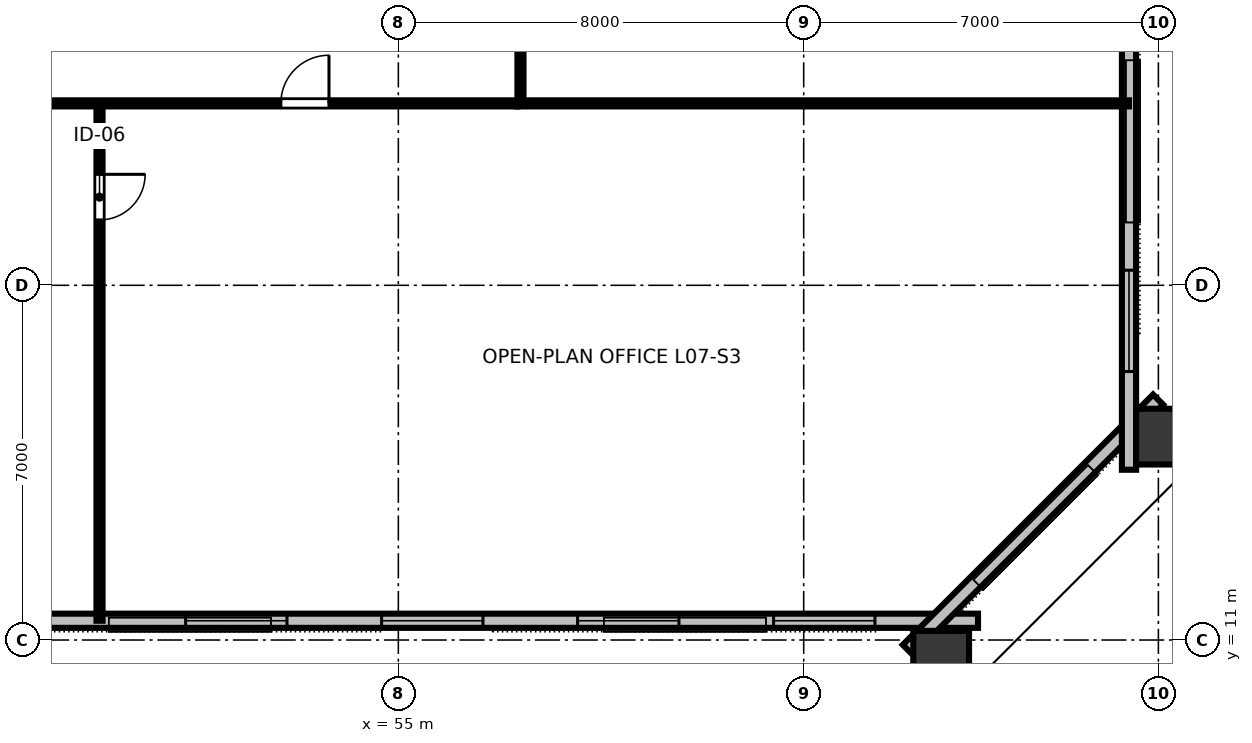
"""IFC4 building model, lengths in metres.
Left out: names, types, materials, properties, quantities, classifications, styles, units other than length and angle.
Written with IfcOpenShell. Run it as: python <this file> out.ifc"""

import sys

from ifc_helpers import new_model, si_unit, direction, frame, frame_2d, origin, origin_2d, place, context, subcontext, project, spatial, rectangle, hollow_rectangle, extrude, element, fill, save


model = new_model("IFC4")
c1 = context("Model", 3, precision=1e-05, world=origin(), true_north=direction((0.0, 1.0)))
c2 = subcontext(c1, "Body", "Model", "MODEL_VIEW")
j1 = project(units=[si_unit("LENGTHUNIT", "METRE"), si_unit("PLANEANGLEUNIT", "RADIAN")], contexts=[c1])
p1 = place(None, origin())
s1 = spatial("IfcSite", under=j1, at=p1, CompositionType="ELEMENT")
p2 = place(p1, origin())
s2 = spatial("IfcBuilding", under=s1, at=p2, CompositionType="ELEMENT")
p3 = place(p2, frame((0.0, 0.0, 31.6)))
s3 = spatial("IfcBuildingStorey", under=s2, at=p3, CompositionType="ELEMENT", Elevation=31.6)
for number, where, z_axis, x_axis in (
    (1, (65.713, 10.531, 0.0), (0.0, 0.0, 1.0), (1.0, 0.0, 0.0)),
    (2, (70.211, 15.013, 0.0), (0.0, 0.0, 1.0), (0.0, 1.0, 0.0)),
):
    element("IfcColumn", number, at=place(p3, frame(where, z_axis=z_axis, x_axis=x_axis)), inside=s3, PredefinedType="COLUMN", context=c2, shape_type="SweptSolid", body=[
        extrude(hollow_rectangle(XDim=1.1, YDim=1.3, WallThickness=0.07, at=origin_2d()), origin(), (0.0, 0.0, 1.0), 3.148),
    ])
p4 = place(p3, frame((25.56, 11.38, 0.0), z_axis=(0.0, 0.0, 1.0), x_axis=(1.0, 0.0, 0.0)))
e3 = element("IfcWall", 3, at=p4, inside=s3, PredefinedType="STANDARD", context=c2, shape_type="SweptSolid", body=[
    extrude(rectangle(XDim=40.88, YDim=0.28, at=frame_2d((20.44, 0.0))), origin(), (0.0, 0.0, 1.0), 3.15),
])
p5 = place(p4, frame((2.034, 0.0, 0.8)))
e4 = element("IfcOpeningElement", 4, at=p5, cuts=e3, PredefinedType="OPENING", context=c2, shape_type="SweptSolid", body=[
    extrude(rectangle(XDim=2.0, YDim=1.95, at=frame_2d((1.0, 0.975))), frame((0.0, 0.15, 0.0), z_axis=(0.0, -1.0, 0.0), x_axis=(1.0, 0.0, 0.0)), (0.0, 0.0, 1.0), 0.3),
])
p6 = place(p4, frame((5.902, 0.0, 0.8)))
e5 = element("IfcOpeningElement", 5, at=p6, cuts=e3, PredefinedType="OPENING", context=c2, shape_type="SweptSolid", body=[
    extrude(rectangle(XDim=2.0, YDim=1.95, at=frame_2d((1.0, 0.975))), frame((0.0, 0.15, 0.0), z_axis=(0.0, -1.0, 0.0), x_axis=(1.0, 0.0, 0.0)), (0.0, 0.0, 1.0), 0.3),
])
p7 = place(p4, frame((9.77, 0.0, 0.8)))
e6 = element("IfcOpeningElement", 6, at=p7, cuts=e3, PredefinedType="OPENING", context=c2, shape_type="SweptSolid", body=[
    extrude(rectangle(XDim=2.0, YDim=1.95, at=frame_2d((1.0, 0.975))), frame((0.0, 0.15, 0.0), z_axis=(0.0, -1.0, 0.0), x_axis=(1.0, 0.0, 0.0)), (0.0, 0.0, 1.0), 0.3),
])
p8 = place(p4, frame((25.242, 0.0, 0.8)))
e7 = element("IfcOpeningElement", 7, at=p8, cuts=e3, PredefinedType="OPENING", context=c2, shape_type="SweptSolid", body=[
    extrude(rectangle(XDim=2.0, YDim=1.95, at=frame_2d((1.0, 0.975))), frame((0.0, 0.15, 0.0), z_axis=(0.0, -1.0, 0.0), x_axis=(1.0, 0.0, 0.0)), (0.0, 0.0, 1.0), 0.3),
])
p9 = place(p4, frame((29.11, 0.0, 0.8)))
e8 = element("IfcOpeningElement", 8, at=p9, cuts=e3, PredefinedType="OPENING", context=c2, shape_type="SweptSolid", body=[
    extrude(rectangle(XDim=2.0, YDim=1.95, at=frame_2d((1.0, 0.975))), frame((0.0, 0.15, 0.0), z_axis=(0.0, -1.0, 0.0), x_axis=(1.0, 0.0, 0.0)), (0.0, 0.0, 1.0), 0.3),
])
p10 = place(p4, frame((32.978, 0.0, 0.8)))
e9 = element("IfcOpeningElement", 9, at=p10, cuts=e3, PredefinedType="OPENING", context=c2, shape_type="SweptSolid", body=[
    extrude(rectangle(XDim=2.0, YDim=1.95, at=frame_2d((1.0, 0.975))), frame((0.0, 0.15, 0.0), z_axis=(0.0, -1.0, 0.0), x_axis=(1.0, 0.0, 0.0)), (0.0, 0.0, 1.0), 0.3),
])
p11 = place(p4, frame((36.846, 0.0, 0.8)))
e10 = element("IfcOpeningElement", 10, at=p11, cuts=e3, PredefinedType="OPENING", context=c2, shape_type="SweptSolid", body=[
    extrude(rectangle(XDim=2.0, YDim=1.95, at=frame_2d((1.0, 0.975))), frame((0.0, 0.15, 0.0), z_axis=(0.0, -1.0, 0.0), x_axis=(1.0, 0.0, 0.0)), (0.0, 0.0, 1.0), 0.3),
])
p12 = place(p3, frame((65.054, 10.806, 0.0), z_axis=(0.0, 0.0, 1.0), x_axis=(0.707106781187, 0.707106781187, 0.0)))
e11 = element("IfcWall", 11, at=p12, inside=s3, PredefinedType="STANDARD", context=c2, shape_type="SweptSolid", body=[
    extrude(rectangle(XDim=6.985, YDim=0.28, at=frame_2d((3.493, 0.0))), origin(), (0.0, 0.0, 1.0), 3.15),
])
p13 = place(p3, frame((69.42, 14.36, 0.0), z_axis=(0.0, 0.0, 1.0), x_axis=(0.0, 1.0, 0.0)))
e12 = element("IfcWall", 12, at=p13, inside=s3, PredefinedType="STANDARD", context=c2, shape_type="SweptSolid", body=[
    extrude(rectangle(XDim=35.28, YDim=0.28, at=frame_2d((17.64, 0.0))), origin(), (0.0, 0.0, 1.0), 3.15),
])
p14 = place(p13, frame((1.938, 0.0, 0.8)))
e13 = element("IfcOpeningElement", 13, at=p14, cuts=e12, PredefinedType="OPENING", context=c2, shape_type="SweptSolid", body=[
    extrude(rectangle(XDim=2.0, YDim=1.95, at=frame_2d((1.0, 0.975))), frame((0.0, 0.15, 0.0), z_axis=(0.0, -1.0, 0.0), x_axis=(1.0, 0.0, 0.0)), (0.0, 0.0, 1.0), 0.3),
])
p15 = place(p13, frame((9.289, 0.0, 0.8)))
e14 = element("IfcOpeningElement", 14, at=p15, cuts=e12, PredefinedType="OPENING", context=c2, shape_type="SweptSolid", body=[
    extrude(rectangle(XDim=2.0, YDim=1.95, at=frame_2d((1.0, 0.975))), frame((0.0, 0.15, 0.0), z_axis=(0.0, -1.0, 0.0), x_axis=(1.0, 0.0, 0.0)), (0.0, 0.0, 1.0), 0.3),
])
p16 = place(p13, frame((12.964, 0.0, 0.8)))
e15 = element("IfcOpeningElement", 15, at=p16, cuts=e12, PredefinedType="OPENING", context=c2, shape_type="SweptSolid", body=[
    extrude(rectangle(XDim=2.0, YDim=1.95, at=frame_2d((1.0, 0.975))), frame((0.0, 0.15, 0.0), z_axis=(0.0, -1.0, 0.0), x_axis=(1.0, 0.0, 0.0)), (0.0, 0.0, 1.0), 0.3),
])
p17 = place(p13, frame((20.316, 0.0, 0.8)))
e16 = element("IfcOpeningElement", 16, at=p17, cuts=e12, PredefinedType="OPENING", context=c2, shape_type="SweptSolid", body=[
    extrude(rectangle(XDim=2.0, YDim=1.95, at=frame_2d((1.0, 0.975))), frame((0.0, 0.15, 0.0), z_axis=(0.0, -1.0, 0.0), x_axis=(1.0, 0.0, 0.0)), (0.0, 0.0, 1.0), 0.3),
])
p18 = place(p13, frame((23.991, 0.0, 0.8)))
e17 = element("IfcOpeningElement", 17, at=p18, cuts=e12, PredefinedType="OPENING", context=c2, shape_type="SweptSolid", body=[
    extrude(rectangle(XDim=2.0, YDim=1.95, at=frame_2d((1.0, 0.975))), frame((0.0, 0.15, 0.0), z_axis=(0.0, -1.0, 0.0), x_axis=(1.0, 0.0, 0.0)), (0.0, 0.0, 1.0), 0.3),
])
p19 = place(p13, frame((31.342, 0.0, 0.8)))
e18 = element("IfcOpeningElement", 18, at=p19, cuts=e12, PredefinedType="OPENING", context=c2, shape_type="SweptSolid", body=[
    extrude(rectangle(XDim=2.0, YDim=1.95, at=frame_2d((1.0, 0.975))), frame((0.0, 0.15, 0.0), z_axis=(0.0, -1.0, 0.0), x_axis=(1.0, 0.0, 0.0)), (0.0, 0.0, 1.0), 0.3),
])
p20 = place(p3, frame((49.102, 21.59, 0.0), z_axis=(0.0, 0.0, 1.0), x_axis=(0.0, -1.0, 0.0)))
e19 = element("IfcWall", 19, at=p20, inside=s3, PredefinedType="PARTITIONING", context=c2, shape_type="SweptSolid", body=[
    extrude(rectangle(XDim=10.21, YDim=0.12, at=frame_2d((5.105, 0.0))), origin(), (0.0, 0.0, 1.0), 2.43),
])
p21 = place(p20, frame((1.4, 0.0, 0.0)))
e20 = element("IfcOpeningElement", 20, at=p21, cuts=e19, PredefinedType="OPENING", context=c2, shape_type="SweptSolid", body=[
    extrude(rectangle(XDim=0.9, YDim=2.15, at=frame_2d((0.45, 1.075))), frame((0.0, 0.07, 0.0), z_axis=(0.0, -1.0, 0.0), x_axis=(1.0, 0.0, 0.0)), (0.0, 0.0, 1.0), 0.14),
])
p22 = place(p3, frame((34.65, 21.59, 0.0), z_axis=(0.0, 0.0, 1.0), x_axis=(1.0, 0.0, 0.0)))
e21 = element("IfcWall", 21, at=p22, inside=s3, PredefinedType="PARTITIONING", context=c2, shape_type="SweptSolid", body=[
    extrude(rectangle(XDim=22.7, YDim=0.12, at=frame_2d((11.35, 0.0))), origin(), (0.0, 0.0, 1.0), 2.43),
])
p23 = place(p22, frame((2.224, 0.0, 0.0)))
e22 = element("IfcOpeningElement", 22, at=p23, cuts=e21, PredefinedType="OPENING", context=c2, shape_type="SweptSolid", body=[
    extrude(rectangle(XDim=0.95, YDim=2.15, at=frame_2d((0.475, 1.075))), frame((0.0, 0.07, 0.0), z_axis=(0.0, -1.0, 0.0), x_axis=(1.0, 0.0, 0.0)), (0.0, 0.0, 1.0), 0.14),
])
p24 = place(p22, frame((9.381, 0.0, 0.0)))
e23 = element("IfcOpeningElement", 23, at=p24, cuts=e21, PredefinedType="OPENING", context=c2, shape_type="SweptSolid", body=[
    extrude(rectangle(XDim=0.95, YDim=2.15, at=frame_2d((0.475, 1.075))), frame((0.0, 0.07, 0.0), z_axis=(0.0, -1.0, 0.0), x_axis=(1.0, 0.0, 0.0)), (0.0, 0.0, 1.0), 0.14),
])
p25 = place(p22, frame((18.031, 0.0, 0.0)))
e24 = element("IfcOpeningElement", 24, at=p25, cuts=e21, PredefinedType="OPENING", context=c2, shape_type="SweptSolid", body=[
    extrude(rectangle(XDim=0.95, YDim=2.15, at=frame_2d((0.475, 1.075))), frame((0.0, 0.07, 0.0), z_axis=(0.0, -1.0, 0.0), x_axis=(1.0, 0.0, 0.0)), (0.0, 0.0, 1.0), 0.14),
])
p26 = place(p3, frame((57.41, 21.65, 0.0), z_axis=(0.0, 0.0, 1.0), x_axis=(0.0, 1.0, 0.0)))
e25 = element("IfcWall", 25, at=p26, inside=s3, PredefinedType="PARTITIONING", context=c2, shape_type="SweptSolid", body=[
    extrude(rectangle(XDim=20.7, YDim=0.12, at=frame_2d((10.35, 0.0))), origin(), (0.0, 0.0, 1.0), 2.43),
])
p27 = place(p26, frame((5.31, 0.0, 0.0)))
e26 = element("IfcOpeningElement", 26, at=p27, cuts=e25, PredefinedType="OPENING", context=c2, shape_type="SweptSolid", body=[
    extrude(rectangle(XDim=0.95, YDim=2.15, at=frame_2d((0.475, 1.075))), frame((0.0, 0.07, 0.0), z_axis=(0.0, -1.0, 0.0), x_axis=(1.0, 0.0, 0.0)), (0.0, 0.0, 1.0), 0.14),
])
p28 = place(p26, frame((15.459, 0.0, 0.0)))
e27 = element("IfcOpeningElement", 27, at=p28, cuts=e25, PredefinedType="OPENING", context=c2, shape_type="SweptSolid", body=[
    extrude(rectangle(XDim=0.95, YDim=2.15, at=frame_2d((0.475, 1.075))), frame((0.0, 0.07, 0.0), z_axis=(0.0, -1.0, 0.0), x_axis=(1.0, 0.0, 0.0)), (0.0, 0.0, 1.0), 0.14),
])
p29 = place(p3, frame((57.35, 21.59, 0.0), z_axis=(0.0, 0.0, 1.0), x_axis=(1.0, 0.0, 0.0)))
e28 = element("IfcWall", 28, at=p29, inside=s3, PredefinedType="PARTITIONING", context=c2, shape_type="SweptSolid", body=[
    extrude(rectangle(XDim=12.07, YDim=0.12, at=frame_2d((6.035, 0.0))), origin(), (0.0, 0.0, 1.0), 2.43),
])
p30 = place(p8, origin())
e29 = element("IfcWindow", 29, at=p30, inside=s3, PartitioningType="SINGLE_PANEL", PredefinedType="WINDOW", context=c2, shape_type="SweptSolid", body=[
    extrude(rectangle(XDim=2.0, YDim=1.95, at=frame_2d((1.0, 0.975))), frame((0.0, 0.03, 0.0), z_axis=(0.0, -1.0, 0.0), x_axis=(1.0, 0.0, 0.0)), (0.0, 0.0, 1.0), 0.06),
])
fill(e7, e29)
p31 = place(p9, origin())
e30 = element("IfcWindow", 30, at=p31, inside=s3, PartitioningType="SINGLE_PANEL", PredefinedType="WINDOW", context=c2, shape_type="SweptSolid", body=[
    extrude(rectangle(XDim=2.0, YDim=1.95, at=frame_2d((1.0, 0.975))), frame((0.0, 0.03, 0.0), z_axis=(0.0, -1.0, 0.0), x_axis=(1.0, 0.0, 0.0)), (0.0, 0.0, 1.0), 0.06),
])
fill(e8, e30)
p32 = place(p10, origin())
e31 = element("IfcWindow", 31, at=p32, inside=s3, PartitioningType="SINGLE_PANEL", PredefinedType="WINDOW", context=c2, shape_type="SweptSolid", body=[
    extrude(rectangle(XDim=2.0, YDim=1.95, at=frame_2d((1.0, 0.975))), frame((0.0, 0.03, 0.0), z_axis=(0.0, -1.0, 0.0), x_axis=(1.0, 0.0, 0.0)), (0.0, 0.0, 1.0), 0.06),
])
fill(e9, e31)
p33 = place(p11, origin())
e32 = element("IfcWindow", 32, at=p33, inside=s3, PartitioningType="SINGLE_PANEL", PredefinedType="WINDOW", context=c2, shape_type="SweptSolid", body=[
    extrude(rectangle(XDim=2.0, YDim=1.95, at=frame_2d((1.0, 0.975))), frame((0.0, 0.03, 0.0), z_axis=(0.0, -1.0, 0.0), x_axis=(1.0, 0.0, 0.0)), (0.0, 0.0, 1.0), 0.06),
])
fill(e10, e32)
p34 = place(p14, origin())
e33 = element("IfcWindow", 33, at=p34, inside=s3, PartitioningType="SINGLE_PANEL", PredefinedType="WINDOW", context=c2, shape_type="SweptSolid", body=[
    extrude(rectangle(XDim=2.0, YDim=1.95, at=frame_2d((1.0, 0.975))), frame((0.0, 0.03, 0.0), z_axis=(0.0, -1.0, 0.0), x_axis=(1.0, 0.0, 0.0)), (0.0, 0.0, 1.0), 0.06),
])
fill(e13, e33)
p35 = place(p21, origin())
e34 = element("IfcDoor", 34, at=p35, inside=s3, OperationType="SINGLE_SWING_LEFT", PredefinedType="DOOR", context=c2, shape_type="SweptSolid", body=[
    extrude(rectangle(XDim=0.9, YDim=2.15, at=frame_2d((0.45, 1.075))), frame((0.0, 0.025, 0.0), z_axis=(0.0, -1.0, 0.0), x_axis=(1.0, 0.0, 0.0)), (0.0, 0.0, 1.0), 0.05),
])
fill(e20, e34)
p36 = place(p25, origin())
e35 = element("IfcDoor", 35, at=p36, inside=s3, OperationType="SINGLE_SWING_RIGHT", PredefinedType="DOOR", context=c2, shape_type="SweptSolid", body=[
    extrude(rectangle(XDim=0.95, YDim=2.15, at=frame_2d((0.475, 1.075))), frame((0.0, 0.025, 0.0), z_axis=(0.0, -1.0, 0.0), x_axis=(1.0, 0.0, 0.0)), (0.0, 0.0, 1.0), 0.05),
])
fill(e24, e35)
save(model, sys.argv[1])
